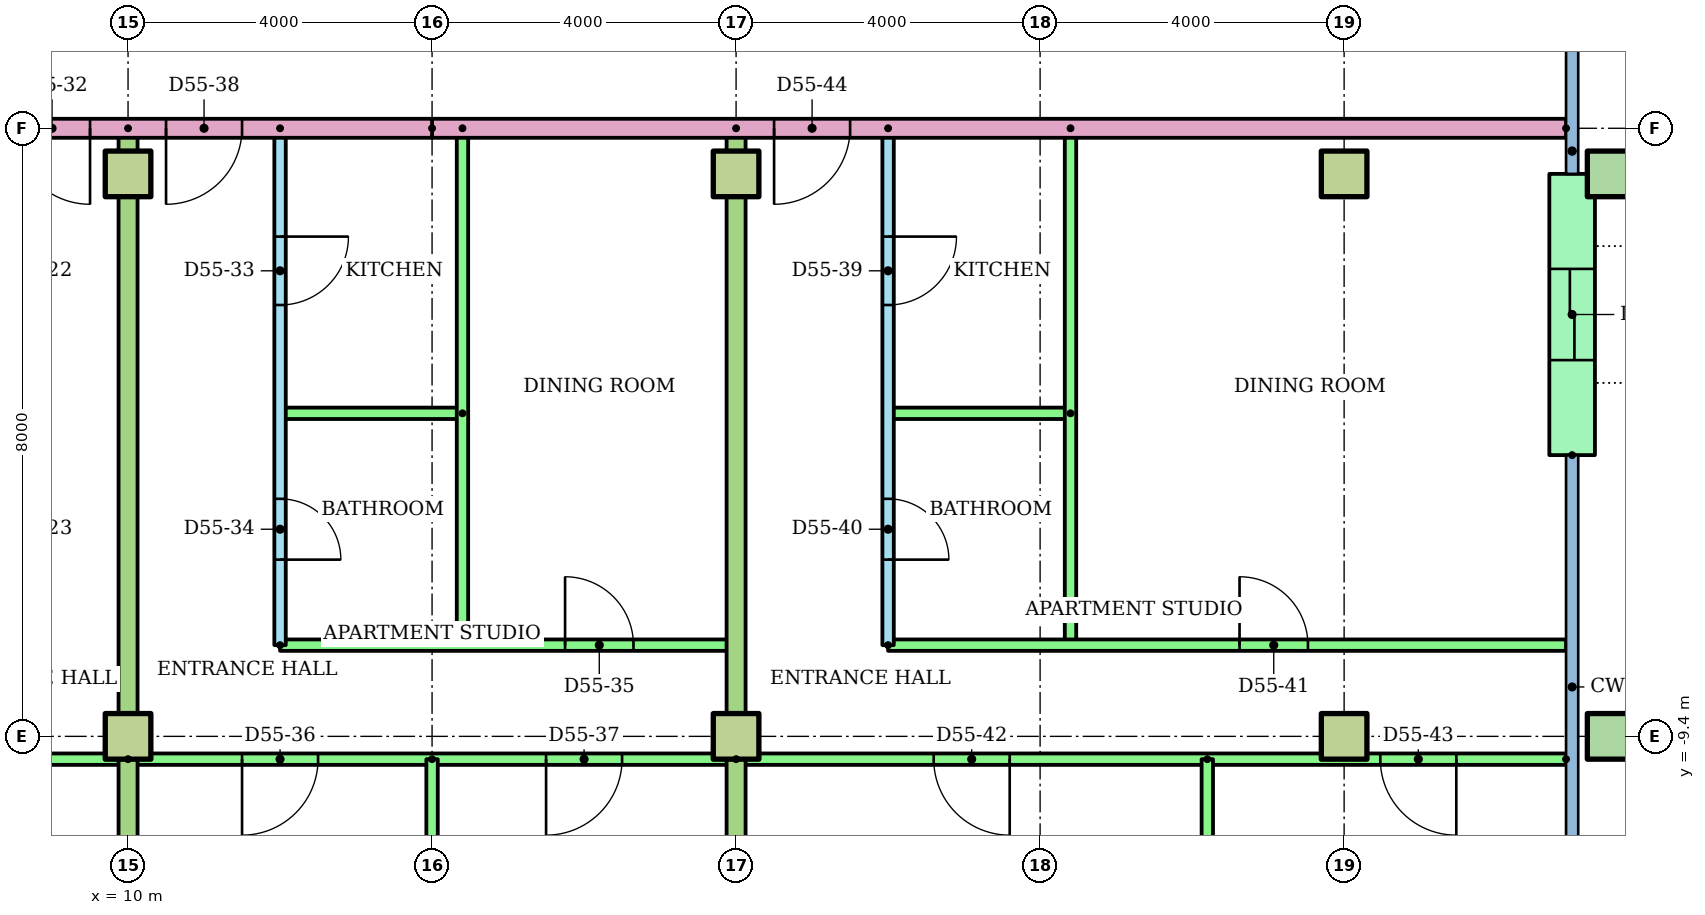
"""IFC4 building model, lengths in metres.
Left out: names, types, materials, properties, quantities, classifications, styles, units other than length and angle.
Written with IfcOpenShell. Run it as: python <this file> out.ifc"""

import sys

from ifc_helpers import new_model, si_unit, direction, frame, frame_2d, origin, origin_2d, place, context, subcontext, project, spatial, rectangle, hollow_rectangle, extrude, element, fill, save


model = new_model("IFC4")
c1 = context("Model", 3, precision=1e-05, world=origin(), true_north=direction((0.0, 1.0)))
c2 = subcontext(c1, "Body", "Model", "MODEL_VIEW")
j1 = project(units=[si_unit("LENGTHUNIT", "METRE"), si_unit("PLANEANGLEUNIT", "RADIAN")], contexts=[c1])
p1 = place(None, origin())
s1 = spatial("IfcSite", under=j1, at=p1, CompositionType="ELEMENT")
p2 = place(p1, origin())
s2 = spatial("IfcBuilding", under=s1, at=p2, CompositionType="ELEMENT")
p3 = place(p2, frame((0.0, 0.0, 214.0)))
s3 = spatial("IfcBuildingStorey", under=s2, at=p3, CompositionType="ELEMENT", Elevation=214.0)
for number, where in (
    (1, (10.0, -9.4, 0.0)),
    (2, (18.0, -9.4, 0.0)),
    (3, (26.0, -9.4, 0.0)),
):
    element("IfcColumn", number, at=place(p3, frame(where)), inside=s3, PredefinedType="COLUMN", context=c2, shape_type="SweptSolid", body=[
        extrude(rectangle(XDim=0.6, YDim=0.6, at=origin_2d()), origin(), (0.0, 0.0, 1.0), 3.2),
    ])
p4 = place(p3, frame((29.5, -9.4, 0.0)))
e4 = element("IfcColumn", 4, at=p4, inside=s3, PredefinedType="COLUMN", context=c2, shape_type="SweptSolid", body=[
    extrude(hollow_rectangle(XDim=0.6, YDim=0.6, WallThickness=0.03, at=origin_2d()), origin(), (0.0, 0.0, 1.0), 3.2),
])
for number, where in (
    (5, (10.0, -2.0, 0.0)),
    (6, (18.0, -2.0, 0.0)),
    (7, (26.0, -2.0, 0.0)),
):
    element("IfcColumn", number, at=place(p3, frame(where)), inside=s3, PredefinedType="COLUMN", context=c2, shape_type="SweptSolid", body=[
        extrude(rectangle(XDim=0.6, YDim=0.6, at=origin_2d()), origin(), (0.0, 0.0, 1.0), 3.2),
    ])
p5 = place(p3, frame((29.5, -2.0, 0.0)))
e8 = element("IfcColumn", 8, at=p5, inside=s3, PredefinedType="COLUMN", context=c2, shape_type="SweptSolid", body=[
    extrude(hollow_rectangle(XDim=0.6, YDim=0.6, WallThickness=0.03, at=origin_2d()), origin(), (0.0, 0.0, 1.0), 3.2),
])
p6 = place(p3, frame((29.0, -5.7, 0.0), z_axis=(0.0, 0.0, 1.0), x_axis=(0.0, 1.0, 0.0)))
e9 = element("IfcWall", 9, at=p6, inside=s3, PredefinedType="STANDARD", context=c2, shape_type="SweptSolid", body=[
    extrude(rectangle(XDim=3.7, YDim=0.6, at=frame_2d((1.85, 0.0))), origin(), (0.0, 0.0, 1.0), 2.92),
])
p7 = place(p6, frame((1.25, 0.0, 0.0)))
e10 = element("IfcOpeningElement", 10, at=p7, cuts=e9, PredefinedType="OPENING", context=c2, shape_type="SweptSolid", body=[
    extrude(rectangle(XDim=1.2, YDim=2.1, at=frame_2d((0.6, 1.05))), frame((0.0, 0.31, 0.0), z_axis=(0.0, -1.0, 0.0), x_axis=(1.0, 0.0, 0.0)), (0.0, 0.0, 1.0), 0.62),
])
p8 = place(p3, frame((10.0, -9.7, 0.0), z_axis=(0.0, 0.0, 1.0), x_axis=(-1.0, 0.0, 0.0)))
e11 = element("IfcWall", 11, at=p8, inside=s3, PredefinedType="PARTITIONING", context=c2, shape_type="SweptSolid", body=[
    extrude(rectangle(XDim=24.0, YDim=0.15, at=frame_2d((12.0, 0.0))), origin(), (0.0, 0.0, 1.0), 2.4),
])
p9 = place(p8, frame((21.55, 0.0, 0.0)))
e12 = element("IfcOpeningElement", 12, at=p9, cuts=e11, PredefinedType="OPENING", context=c2, shape_type="SweptSolid", body=[
    extrude(rectangle(XDim=0.9, YDim=2.1, at=frame_2d((0.45, 1.05))), frame((0.0, 0.085, 0.0), z_axis=(0.0, -1.0, 0.0), x_axis=(1.0, 0.0, 0.0)), (0.0, 0.0, 1.0), 0.17),
])
p10 = place(p8, frame((17.55, 0.0, 0.0)))
e13 = element("IfcOpeningElement", 13, at=p10, cuts=e11, PredefinedType="OPENING", context=c2, shape_type="SweptSolid", body=[
    extrude(rectangle(XDim=0.9, YDim=2.1, at=frame_2d((0.45, 1.05))), frame((0.0, 0.085, 0.0), z_axis=(0.0, -1.0, 0.0), x_axis=(1.0, 0.0, 0.0)), (0.0, 0.0, 1.0), 0.17),
])
p11 = place(p8, frame((11.5, 0.0, 0.0)))
e14 = element("IfcOpeningElement", 14, at=p11, cuts=e11, PredefinedType="OPENING", context=c2, shape_type="SweptSolid", body=[
    extrude(rectangle(XDim=1.0, YDim=2.1, at=frame_2d((0.5, 1.05))), frame((0.0, 0.085, 0.0), z_axis=(0.0, -1.0, 0.0), x_axis=(1.0, 0.0, 0.0)), (0.0, 0.0, 1.0), 0.17),
])
p12 = place(p8, frame((5.55, 0.0, 0.0)))
e15 = element("IfcOpeningElement", 15, at=p12, cuts=e11, PredefinedType="OPENING", context=c2, shape_type="SweptSolid", body=[
    extrude(rectangle(XDim=0.9, YDim=2.1, at=frame_2d((0.45, 1.05))), frame((0.0, 0.085, 0.0), z_axis=(0.0, -1.0, 0.0), x_axis=(1.0, 0.0, 0.0)), (0.0, 0.0, 1.0), 0.17),
])
p13 = place(p8, frame((1.55, 0.0, 0.0)))
e16 = element("IfcOpeningElement", 16, at=p13, cuts=e11, PredefinedType="OPENING", context=c2, shape_type="SweptSolid", body=[
    extrude(rectangle(XDim=0.9, YDim=2.1, at=frame_2d((0.45, 1.05))), frame((0.0, 0.085, 0.0), z_axis=(0.0, -1.0, 0.0), x_axis=(1.0, 0.0, 0.0)), (0.0, 0.0, 1.0), 0.17),
])
p14 = place(p3, frame((12.0, -1.4, 0.0), z_axis=(0.0, 0.0, 1.0), x_axis=(0.0, -1.0, 0.0)))
e17 = element("IfcWall", 17, at=p14, inside=s3, PredefinedType="PARTITIONING", context=c2, shape_type="SweptSolid", body=[
    extrude(rectangle(XDim=6.8, YDim=0.15, at=frame_2d((3.4, 0.0))), origin(), (0.0, 0.0, 1.0), 2.4),
])
p15 = place(p14, frame((1.425, 0.0, 0.0)))
e18 = element("IfcOpeningElement", 18, at=p15, cuts=e17, PredefinedType="OPENING", context=c2, shape_type="SweptSolid", body=[
    extrude(rectangle(XDim=0.9, YDim=2.1, at=frame_2d((0.45, 1.05))), frame((0.0, 0.085, 0.0), z_axis=(0.0, -1.0, 0.0), x_axis=(1.0, 0.0, 0.0)), (0.0, 0.0, 1.0), 0.17),
])
p16 = place(p14, frame((4.875, 0.0, 0.0)))
e19 = element("IfcOpeningElement", 19, at=p16, cuts=e17, PredefinedType="OPENING", context=c2, shape_type="SweptSolid", body=[
    extrude(rectangle(XDim=0.8, YDim=2.1, at=frame_2d((0.4, 1.05))), frame((0.0, 0.085, 0.0), z_axis=(0.0, -1.0, 0.0), x_axis=(1.0, 0.0, 0.0)), (0.0, 0.0, 1.0), 0.17),
])
p17 = place(p3, frame((14.4, -5.15, 0.0), z_axis=(0.0, 0.0, 1.0), x_axis=(-1.0, 0.0, 0.0)))
e20 = element("IfcWall", 20, at=p17, inside=s3, PredefinedType="PARTITIONING", context=c2, shape_type="SweptSolid", body=[
    extrude(rectangle(XDim=2.4, YDim=0.15, at=frame_2d((1.2, 0.0))), origin(), (0.0, 0.0, 1.0), 2.4),
])
p18 = place(p3, frame((14.4, -1.4, 0.0), z_axis=(0.0, 0.0, 1.0), x_axis=(0.0, -1.0, 0.0)))
e21 = element("IfcWall", 21, at=p18, inside=s3, PredefinedType="PARTITIONING", context=c2, shape_type="SweptSolid", body=[
    extrude(rectangle(XDim=6.8, YDim=0.15, at=frame_2d((3.4, 0.0))), origin(), (0.0, 0.0, 1.0), 2.4),
])
p19 = place(p3, frame((12.0, -8.2, 0.0)))
e22 = element("IfcWall", 22, at=p19, inside=s3, PredefinedType="PARTITIONING", context=c2, shape_type="SweptSolid", body=[
    extrude(rectangle(XDim=6.0, YDim=0.15, at=frame_2d((3.0, 0.0))), origin(), (0.0, 0.0, 1.0), 2.4),
])
p20 = place(p19, frame((3.75, 0.0, 0.0)))
e23 = element("IfcOpeningElement", 23, at=p20, cuts=e22, PredefinedType="OPENING", context=c2, shape_type="SweptSolid", body=[
    extrude(rectangle(XDim=0.9, YDim=2.1, at=frame_2d((0.45, 1.05))), frame((0.0, 0.085, 0.0), z_axis=(0.0, -1.0, 0.0), x_axis=(1.0, 0.0, 0.0)), (0.0, 0.0, 1.0), 0.17),
])
p21 = place(p3, frame((18.0, -9.7, 0.0), z_axis=(0.0, 0.0, 1.0), x_axis=(-1.0, 0.0, 0.0)))
e24 = element("IfcWall", 24, at=p21, inside=s3, PredefinedType="PARTITIONING", context=c2, shape_type="SweptSolid", body=[
    extrude(rectangle(XDim=8.0, YDim=0.15, at=frame_2d((4.0, 0.0))), origin(), (0.0, 0.0, 1.0), 2.4),
])
p22 = place(p21, frame((5.5, 0.0, 0.0)))
e25 = element("IfcOpeningElement", 25, at=p22, cuts=e24, PredefinedType="OPENING", context=c2, shape_type="SweptSolid", body=[
    extrude(rectangle(XDim=1.0, YDim=2.1, at=frame_2d((0.5, 1.05))), frame((0.0, 0.085, 0.0), z_axis=(0.0, -1.0, 0.0), x_axis=(1.0, 0.0, 0.0)), (0.0, 0.0, 1.0), 0.17),
])
p23 = place(p21, frame((1.5, 0.0, 0.0)))
e26 = element("IfcOpeningElement", 26, at=p23, cuts=e24, PredefinedType="OPENING", context=c2, shape_type="SweptSolid", body=[
    extrude(rectangle(XDim=1.0, YDim=2.1, at=frame_2d((0.5, 1.05))), frame((0.0, 0.085, 0.0), z_axis=(0.0, -1.0, 0.0), x_axis=(1.0, 0.0, 0.0)), (0.0, 0.0, 1.0), 0.17),
])
p24 = place(p3, frame((14.0, -9.7, 0.0), z_axis=(0.0, 0.0, 1.0), x_axis=(0.0, -1.0, 0.0)))
e27 = element("IfcWall", 27, at=p24, inside=s3, PredefinedType="PARTITIONING", context=c2, shape_type="SweptSolid", body=[
    extrude(rectangle(XDim=6.821, YDim=0.15, at=frame_2d((3.411, 0.0))), origin(), (0.0, 0.0, 1.0), 2.4),
])
p25 = place(p3, frame((10.0, -1.4, 0.0), z_axis=(0.0, 0.0, 1.0), x_axis=(0.0, -1.0, 0.0)))
e28 = element("IfcWall", 28, at=p25, inside=s3, PredefinedType="PARTITIONING", context=c2, shape_type="SweptSolid", body=[
    extrude(rectangle(XDim=15.11, YDim=0.25, at=frame_2d((7.555, 0.0))), origin(), (0.0, 0.0, 1.0), 2.4),
])
p26 = place(p3, frame((20.0, -1.4, 0.0), z_axis=(0.0, 0.0, 1.0), x_axis=(0.0, -1.0, 0.0)))
e29 = element("IfcWall", 29, at=p26, inside=s3, PredefinedType="PARTITIONING", context=c2, shape_type="SweptSolid", body=[
    extrude(rectangle(XDim=6.8, YDim=0.15, at=frame_2d((3.4, 0.0))), origin(), (0.0, 0.0, 1.0), 2.4),
])
p27 = place(p26, frame((1.425, 0.0, 0.0)))
e30 = element("IfcOpeningElement", 30, at=p27, cuts=e29, PredefinedType="OPENING", context=c2, shape_type="SweptSolid", body=[
    extrude(rectangle(XDim=0.9, YDim=2.1, at=frame_2d((0.45, 1.05))), frame((0.0, 0.085, 0.0), z_axis=(0.0, -1.0, 0.0), x_axis=(1.0, 0.0, 0.0)), (0.0, 0.0, 1.0), 0.17),
])
p28 = place(p26, frame((4.875, 0.0, 0.0)))
e31 = element("IfcOpeningElement", 31, at=p28, cuts=e29, PredefinedType="OPENING", context=c2, shape_type="SweptSolid", body=[
    extrude(rectangle(XDim=0.8, YDim=2.1, at=frame_2d((0.4, 1.05))), frame((0.0, 0.085, 0.0), z_axis=(0.0, -1.0, 0.0), x_axis=(1.0, 0.0, 0.0)), (0.0, 0.0, 1.0), 0.17),
])
p29 = place(p3, frame((22.4, -5.15, 0.0), z_axis=(0.0, 0.0, 1.0), x_axis=(-1.0, 0.0, 0.0)))
e32 = element("IfcWall", 32, at=p29, inside=s3, PredefinedType="PARTITIONING", context=c2, shape_type="SweptSolid", body=[
    extrude(rectangle(XDim=2.4, YDim=0.15, at=frame_2d((1.2, 0.0))), origin(), (0.0, 0.0, 1.0), 2.4),
])
p30 = place(p3, frame((22.4, -1.4, 0.0), z_axis=(0.0, 0.0, 1.0), x_axis=(0.0, -1.0, 0.0)))
e33 = element("IfcWall", 33, at=p30, inside=s3, PredefinedType="PARTITIONING", context=c2, shape_type="SweptSolid", body=[
    extrude(rectangle(XDim=6.8, YDim=0.15, at=frame_2d((3.4, 0.0))), origin(), (0.0, 0.0, 1.0), 2.4),
])
p31 = place(p3, frame((20.0, -8.2, 0.0)))
e34 = element("IfcWall", 34, at=p31, inside=s3, PredefinedType="PARTITIONING", context=c2, shape_type="SweptSolid", body=[
    extrude(rectangle(XDim=8.92, YDim=0.15, at=frame_2d((4.46, 0.0))), origin(), (0.0, 0.0, 1.0), 2.4),
])
p32 = place(p31, frame((4.624, 0.0, 0.0)))
e35 = element("IfcOpeningElement", 35, at=p32, cuts=e34, PredefinedType="OPENING", context=c2, shape_type="SweptSolid", body=[
    extrude(rectangle(XDim=0.9, YDim=2.1, at=frame_2d((0.45, 1.05))), frame((0.0, 0.085, 0.0), z_axis=(0.0, -1.0, 0.0), x_axis=(1.0, 0.0, 0.0)), (0.0, 0.0, 1.0), 0.17),
])
p33 = place(p3, frame((28.92, -9.7, 0.0), z_axis=(0.0, 0.0, 1.0), x_axis=(-1.0, 0.0, 0.0)))
e36 = element("IfcWall", 36, at=p33, inside=s3, PredefinedType="PARTITIONING", context=c2, shape_type="SweptSolid", body=[
    extrude(rectangle(XDim=10.92, YDim=0.15, at=frame_2d((5.46, 0.0))), origin(), (0.0, 0.0, 1.0), 2.4),
])
p34 = place(p33, frame((7.32, 0.0, 0.0)))
e37 = element("IfcOpeningElement", 37, at=p34, cuts=e36, PredefinedType="OPENING", context=c2, shape_type="SweptSolid", body=[
    extrude(rectangle(XDim=1.0, YDim=2.1, at=frame_2d((0.5, 1.05))), frame((0.0, 0.085, 0.0), z_axis=(0.0, -1.0, 0.0), x_axis=(1.0, 0.0, 0.0)), (0.0, 0.0, 1.0), 0.17),
])
p35 = place(p33, frame((1.444, 0.0, 0.0)))
e38 = element("IfcOpeningElement", 38, at=p35, cuts=e36, PredefinedType="OPENING", context=c2, shape_type="SweptSolid", body=[
    extrude(rectangle(XDim=1.0, YDim=2.1, at=frame_2d((0.5, 1.05))), frame((0.0, 0.085, 0.0), z_axis=(0.0, -1.0, 0.0), x_axis=(1.0, 0.0, 0.0)), (0.0, 0.0, 1.0), 0.17),
])
p36 = place(p3, frame((24.2, -9.7, 0.0), z_axis=(0.0, 0.0, 1.0), x_axis=(0.0, -1.0, 0.0)))
e39 = element("IfcWall", 39, at=p36, inside=s3, PredefinedType="PARTITIONING", context=c2, shape_type="SweptSolid", body=[
    extrude(rectangle(XDim=5.02, YDim=0.15, at=frame_2d((2.51, 0.0))), origin(), (0.0, 0.0, 1.0), 2.4),
])
p37 = place(p3, frame((18.0, -1.4, 0.0), z_axis=(0.0, 0.0, 1.0), x_axis=(0.0, -1.0, 0.0)))
e40 = element("IfcWall", 40, at=p37, inside=s3, PredefinedType="PARTITIONING", context=c2, shape_type="SweptSolid", body=[
    extrude(rectangle(XDim=15.11, YDim=0.25, at=frame_2d((7.555, 0.0))), origin(), (0.0, 0.0, 1.0), 2.4),
])
p38 = place(p3, frame((28.92, -1.4, 0.0), z_axis=(0.0, 0.0, 1.0), x_axis=(-1.0, 0.0, 0.0)))
e41 = element("IfcWall", 41, at=p38, inside=s3, PredefinedType="PARTITIONING", context=c2, shape_type="SweptSolid", body=[
    extrude(rectangle(XDim=14.92, YDim=0.25, at=frame_2d((7.46, 0.0))), origin(), (0.0, 0.0, 1.0), 2.4),
])
p39 = place(p38, frame((9.42, 0.0, 0.0)))
e42 = element("IfcOpeningElement", 42, at=p39, cuts=e41, PredefinedType="OPENING", context=c2, shape_type="SweptSolid", body=[
    extrude(rectangle(XDim=1.0, YDim=2.1, at=frame_2d((0.5, 1.05))), frame((0.0, 0.135, 0.0), z_axis=(0.0, -1.0, 0.0), x_axis=(1.0, 0.0, 0.0)), (0.0, 0.0, 1.0), 0.27),
])
p40 = place(p3, frame((14.0, -1.4, 0.0), z_axis=(0.0, 0.0, 1.0), x_axis=(-1.0, 0.0, 0.0)))
e43 = element("IfcWall", 43, at=p40, inside=s3, PredefinedType="PARTITIONING", context=c2, shape_type="SweptSolid", body=[
    extrude(rectangle(XDim=28.0, YDim=0.25, at=frame_2d((14.0, 0.0))), origin(), (0.0, 0.0, 1.0), 2.4),
])
p41 = place(p40, frame((4.5, 0.0, 0.0)))
e44 = element("IfcOpeningElement", 44, at=p41, cuts=e43, PredefinedType="OPENING", context=c2, shape_type="SweptSolid", body=[
    extrude(rectangle(XDim=1.0, YDim=2.1, at=frame_2d((0.5, 1.05))), frame((0.0, 0.135, 0.0), z_axis=(0.0, -1.0, 0.0), x_axis=(1.0, 0.0, 0.0)), (0.0, 0.0, 1.0), 0.27),
])
p42 = place(p40, frame((2.5, 0.0, 0.0)))
e45 = element("IfcOpeningElement", 45, at=p42, cuts=e43, PredefinedType="OPENING", context=c2, shape_type="SweptSolid", body=[
    extrude(rectangle(XDim=1.0, YDim=2.1, at=frame_2d((0.5, 1.05))), frame((0.0, 0.135, 0.0), z_axis=(0.0, -1.0, 0.0), x_axis=(1.0, 0.0, 0.0)), (0.0, 0.0, 1.0), 0.27),
])
p43 = place(p41, origin())
e46 = element("IfcDoor", 46, at=p43, inside=s3, OperationType="SINGLE_SWING_LEFT", PredefinedType="DOOR", context=c2, shape_type="SweptSolid", body=[
    extrude(rectangle(XDim=1.0, YDim=2.1, at=frame_2d((0.5, 1.05))), frame((0.0, 0.025, 0.0), z_axis=(0.0, -1.0, 0.0), x_axis=(1.0, 0.0, 0.0)), (0.0, 0.0, 1.0), 0.05),
])
fill(e44, e46)
p44 = place(p15, origin())
e47 = element("IfcDoor", 47, at=p44, inside=s3, OperationType="SINGLE_SWING_LEFT", PredefinedType="DOOR", context=c2, shape_type="SweptSolid", body=[
    extrude(rectangle(XDim=0.9, YDim=2.1, at=frame_2d((0.45, 1.05))), frame((0.0, 0.025, 0.0), z_axis=(0.0, -1.0, 0.0), x_axis=(1.0, 0.0, 0.0)), (0.0, 0.0, 1.0), 0.05),
])
fill(e18, e47)
p45 = place(p16, origin())
e48 = element("IfcDoor", 48, at=p45, inside=s3, OperationType="SINGLE_SWING_RIGHT", PredefinedType="DOOR", context=c2, shape_type="SweptSolid", body=[
    extrude(rectangle(XDim=0.8, YDim=2.1, at=frame_2d((0.4, 1.05))), frame((0.0, 0.025, 0.0), z_axis=(0.0, -1.0, 0.0), x_axis=(1.0, 0.0, 0.0)), (0.0, 0.0, 1.0), 0.05),
])
fill(e19, e48)
p46 = place(p20, origin())
e49 = element("IfcDoor", 49, at=p46, inside=s3, OperationType="SINGLE_SWING_LEFT", PredefinedType="DOOR", context=c2, shape_type="SweptSolid", body=[
    extrude(rectangle(XDim=0.9, YDim=2.1, at=frame_2d((0.45, 1.05))), frame((0.0, 0.025, 0.0), z_axis=(0.0, -1.0, 0.0), x_axis=(1.0, 0.0, 0.0)), (0.0, 0.0, 1.0), 0.05),
])
fill(e23, e49)
p47 = place(p22, origin())
e50 = element("IfcDoor", 50, at=p47, inside=s3, OperationType="SINGLE_SWING_RIGHT", PredefinedType="DOOR", context=c2, shape_type="SweptSolid", body=[
    extrude(rectangle(XDim=1.0, YDim=2.1, at=frame_2d((0.5, 1.05))), frame((0.0, 0.025, 0.0), z_axis=(0.0, -1.0, 0.0), x_axis=(1.0, 0.0, 0.0)), (0.0, 0.0, 1.0), 0.05),
])
fill(e25, e50)
p48 = place(p23, origin())
e51 = element("IfcDoor", 51, at=p48, inside=s3, OperationType="SINGLE_SWING_RIGHT", PredefinedType="DOOR", context=c2, shape_type="SweptSolid", body=[
    extrude(rectangle(XDim=1.0, YDim=2.1, at=frame_2d((0.5, 1.05))), frame((0.0, 0.025, 0.0), z_axis=(0.0, -1.0, 0.0), x_axis=(1.0, 0.0, 0.0)), (0.0, 0.0, 1.0), 0.05),
])
fill(e26, e51)
p49 = place(p42, origin())
e52 = element("IfcDoor", 52, at=p49, inside=s3, OperationType="SINGLE_SWING_RIGHT", PredefinedType="DOOR", context=c2, shape_type="SweptSolid", body=[
    extrude(rectangle(XDim=1.0, YDim=2.1, at=frame_2d((0.5, 1.05))), frame((0.0, 0.025, 0.0), z_axis=(0.0, -1.0, 0.0), x_axis=(1.0, 0.0, 0.0)), (0.0, 0.0, 1.0), 0.05),
])
fill(e45, e52)
p50 = place(p27, origin())
e53 = element("IfcDoor", 53, at=p50, inside=s3, OperationType="SINGLE_SWING_LEFT", PredefinedType="DOOR", context=c2, shape_type="SweptSolid", body=[
    extrude(rectangle(XDim=0.9, YDim=2.1, at=frame_2d((0.45, 1.05))), frame((0.0, 0.025, 0.0), z_axis=(0.0, -1.0, 0.0), x_axis=(1.0, 0.0, 0.0)), (0.0, 0.0, 1.0), 0.05),
])
fill(e30, e53)
p51 = place(p28, origin())
e54 = element("IfcDoor", 54, at=p51, inside=s3, OperationType="SINGLE_SWING_RIGHT", PredefinedType="DOOR", context=c2, shape_type="SweptSolid", body=[
    extrude(rectangle(XDim=0.8, YDim=2.1, at=frame_2d((0.4, 1.05))), frame((0.0, 0.025, 0.0), z_axis=(0.0, -1.0, 0.0), x_axis=(1.0, 0.0, 0.0)), (0.0, 0.0, 1.0), 0.05),
])
fill(e31, e54)
p52 = place(p32, origin())
e55 = element("IfcDoor", 55, at=p52, inside=s3, OperationType="SINGLE_SWING_LEFT", PredefinedType="DOOR", context=c2, shape_type="SweptSolid", body=[
    extrude(rectangle(XDim=0.9, YDim=2.1, at=frame_2d((0.45, 1.05))), frame((0.0, 0.025, 0.0), z_axis=(0.0, -1.0, 0.0), x_axis=(1.0, 0.0, 0.0)), (0.0, 0.0, 1.0), 0.05),
])
fill(e35, e55)
p53 = place(p34, origin())
e56 = element("IfcDoor", 56, at=p53, inside=s3, OperationType="SINGLE_SWING_LEFT", PredefinedType="DOOR", context=c2, shape_type="SweptSolid", body=[
    extrude(rectangle(XDim=1.0, YDim=2.1, at=frame_2d((0.5, 1.05))), frame((0.0, 0.025, 0.0), z_axis=(0.0, -1.0, 0.0), x_axis=(1.0, 0.0, 0.0)), (0.0, 0.0, 1.0), 0.05),
])
fill(e37, e56)
p54 = place(p35, origin())
e57 = element("IfcDoor", 57, at=p54, inside=s3, OperationType="SINGLE_SWING_LEFT", PredefinedType="DOOR", context=c2, shape_type="SweptSolid", body=[
    extrude(rectangle(XDim=1.0, YDim=2.1, at=frame_2d((0.5, 1.05))), frame((0.0, 0.025, 0.0), z_axis=(0.0, -1.0, 0.0), x_axis=(1.0, 0.0, 0.0)), (0.0, 0.0, 1.0), 0.05),
])
fill(e38, e57)
p55 = place(p39, origin())
e58 = element("IfcDoor", 58, at=p55, inside=s3, OperationType="SINGLE_SWING_RIGHT", PredefinedType="DOOR", context=c2, shape_type="SweptSolid", body=[
    extrude(rectangle(XDim=1.0, YDim=2.1, at=frame_2d((0.5, 1.05))), frame((0.0, 0.025, 0.0), z_axis=(0.0, -1.0, 0.0), x_axis=(1.0, 0.0, 0.0)), (0.0, 0.0, 1.0), 0.05),
])
fill(e42, e58)
p56 = place(p7, origin())
e59 = element("IfcDoor", 59, at=p56, inside=s3, OperationType="SLIDING_TO_LEFT", PredefinedType="DOOR", context=c2, shape_type="SweptSolid", body=[
    extrude(rectangle(XDim=1.2, YDim=2.1, at=frame_2d((0.6, 1.05))), frame((0.0, 0.025, 0.0), z_axis=(0.0, -1.0, 0.0), x_axis=(1.0, 0.0, 0.0)), (0.0, 0.0, 1.0), 0.05),
])
fill(e10, e59)
save(model, sys.argv[1])
